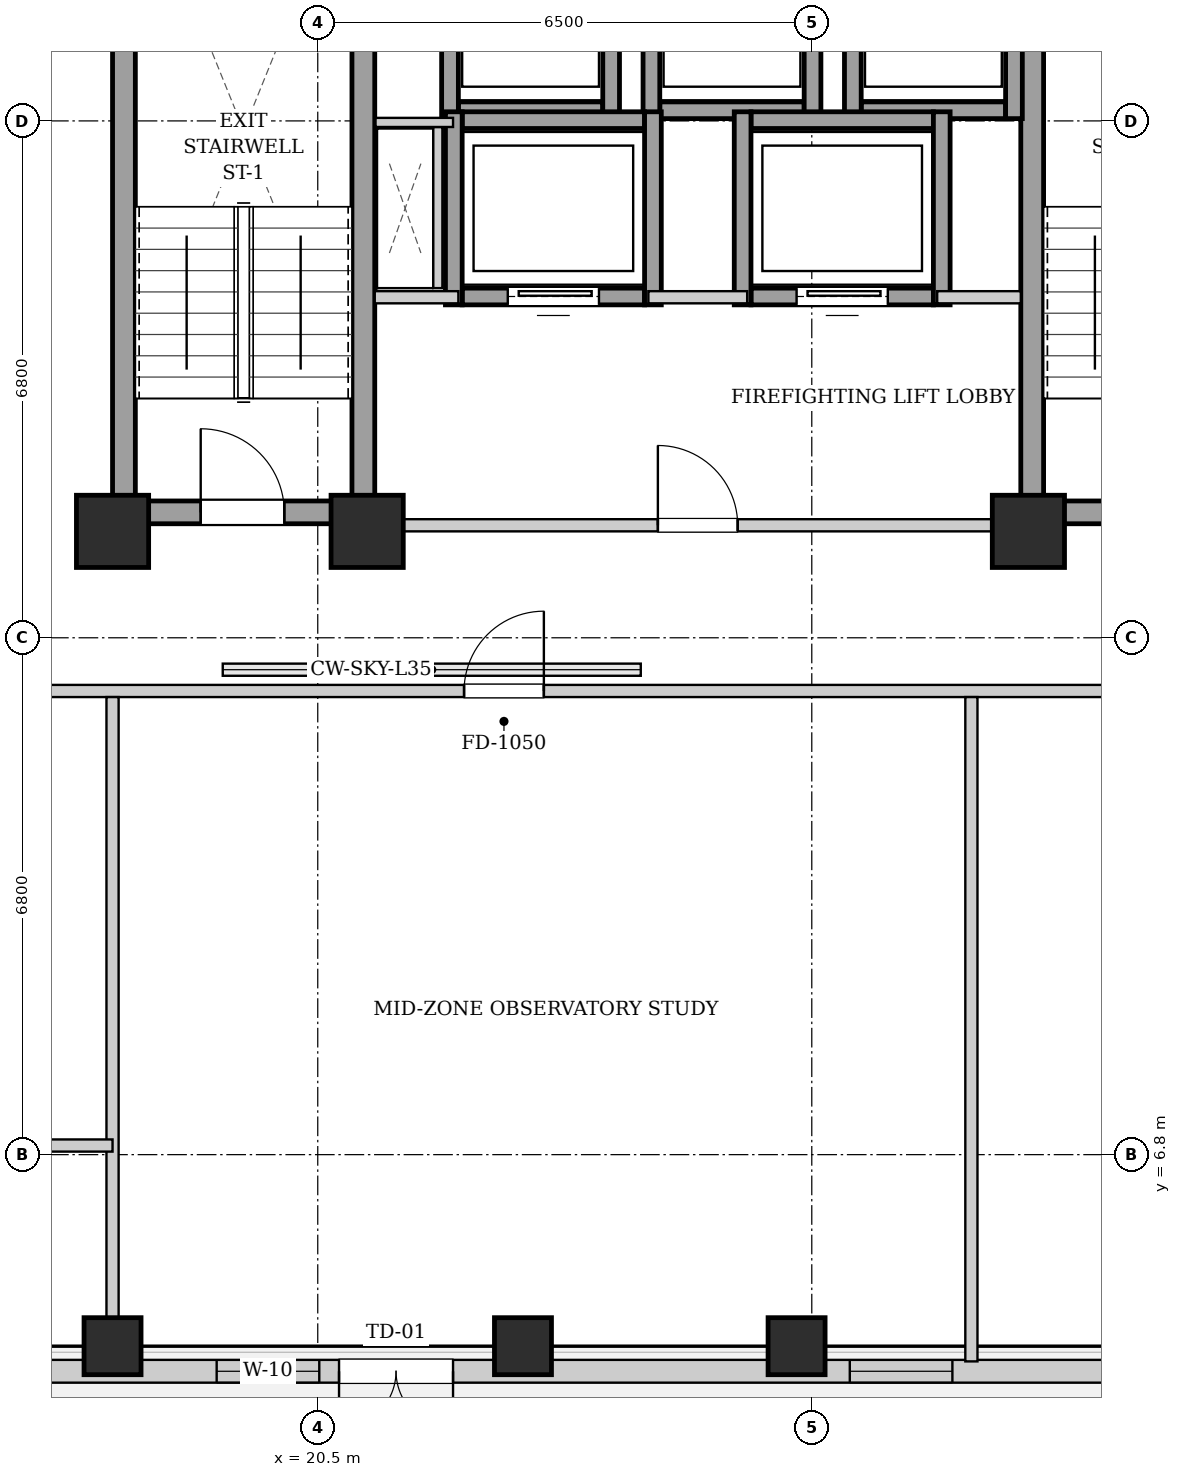
"""IFC4 building model, lengths in metres.
Left out: names, types, materials, properties, quantities, classifications, styles, units other than length and angle.
Written with IfcOpenShell. Run it as: python <this file> out.ifc"""

import sys

from ifc_helpers import new_model, si_unit, direction, frame, frame_2d, origin, origin_2d, place, context, subcontext, project, spatial, rectangle, extrude, element, fill, save


model = new_model("IFC4")
c1 = context("Model", 3, precision=1e-05, world=origin(), true_north=direction((0.0, 1.0)))
c2 = subcontext(c1, "Body", "Model", "MODEL_VIEW")
j1 = project(units=[si_unit("LENGTHUNIT", "METRE"), si_unit("PLANEANGLEUNIT", "RADIAN")], contexts=[c1])
p1 = place(None, origin())
s1 = spatial("IfcSite", under=j1, at=p1, CompositionType="ELEMENT")
p2 = place(p1, origin())
s2 = spatial("IfcBuilding", under=s1, at=p2, CompositionType="ELEMENT")
p3 = place(p2, frame((0.0, 0.0, 124.4)))
s3 = spatial("IfcBuildingStorey", under=s2, at=p3, CompositionType="ELEMENT", Elevation=124.4)
for number, where, z_axis, x_axis in (
    (1, (17.8, 4.28, 0.0), (0.0, 0.0, 1.0), (1.0, 0.0, 0.0)),
    (2, (23.2, 4.28, 0.0), (0.0, 0.0, 1.0), (1.0, 0.0, 0.0)),
    (3, (26.8, 4.28, 0.0), (0.0, 0.0, 1.0), (1.0, 0.0, 0.0)),
):
    element("IfcColumn", number, at=place(p3, frame(where, z_axis=z_axis, x_axis=x_axis)), inside=s3, PredefinedType="COLUMN", context=c2, shape_type="SweptSolid", body=[
        extrude(rectangle(XDim=0.75, YDim=0.75, at=origin_2d()), origin(), (0.0, 0.0, 1.0), 3.25),
    ])
for number, where, z_axis, x_axis in (
    (4, (17.8, 15.0, 0.0), (0.0, 0.0, 1.0), (1.0, 0.0, 0.0)),
    (5, (21.15, 15.0, 0.0), (0.0, 0.0, 1.0), (1.0, 0.0, 0.0)),
    (6, (29.85, 15.0, 0.0), (0.0, 0.0, 1.0), (1.0, 0.0, 0.0)),
):
    element("IfcColumn", number, at=place(p3, frame(where, z_axis=z_axis, x_axis=x_axis)), inside=s3, PredefinedType="COLUMN", context=c2, shape_type="SweptSolid", body=[
        extrude(rectangle(XDim=0.95, YDim=0.95, at=origin_2d()), origin(), (0.0, 0.0, 1.0), 3.25),
    ])
p4 = place(p3, frame((37.8, 3.95, 0.0), z_axis=(0.0, 0.0, 1.0), x_axis=(-1.0, 0.0, 0.0)))
e7 = element("IfcWall", 7, at=p4, inside=s3, PredefinedType="SOLIDWALL", context=c2, shape_type="SweptSolid", body=[
    extrude(rectangle(XDim=27.8, YDim=0.3, at=frame_2d((13.9, 0.0))), origin(), (0.0, 0.0, 1.0), 2.99),
])
p5 = place(p4, frame((15.52, 0.0, 0.0)))
e8 = element("IfcOpeningElement", 8, at=p5, cuts=e7, PredefinedType="OPENING", context=c2, shape_type="SweptSolid", body=[
    extrude(rectangle(XDim=1.5, YDim=1.982, at=frame_2d((0.75, 0.991))), frame((0.0, 0.16, 0.0), z_axis=(0.0, -1.0, 0.0), x_axis=(1.0, 0.0, 0.0)), (0.0, 0.0, 1.0), 0.32),
])
p6 = place(p4, frame((17.28, 0.0, 0.55)))
e9 = element("IfcOpeningElement", 9, at=p6, cuts=e7, PredefinedType="OPENING", context=c2, shape_type="SweptSolid", body=[
    extrude(rectangle(XDim=1.35, YDim=1.2, at=frame_2d((0.675, 0.6))), frame((0.0, 0.16, 0.0), z_axis=(0.0, -1.0, 0.0), x_axis=(1.0, 0.0, 0.0)), (0.0, 0.0, 1.0), 0.32),
])
p7 = place(p4, frame((8.95, 0.0, 0.55)))
e10 = element("IfcOpeningElement", 10, at=p7, cuts=e7, PredefinedType="OPENING", context=c2, shape_type="SweptSolid", body=[
    extrude(rectangle(XDim=1.35, YDim=1.2, at=frame_2d((0.675, 0.6))), frame((0.0, 0.16, 0.0), z_axis=(0.0, -1.0, 0.0), x_axis=(1.0, 0.0, 0.0)), (0.0, 0.0, 1.0), 0.32),
])
p8 = place(p4, frame((5.135, 0.0, 0.55)))
e11 = element("IfcOpeningElement", 11, at=p8, cuts=e7, PredefinedType="OPENING", context=c2, shape_type="SweptSolid", body=[
    extrude(rectangle(XDim=1.35, YDim=1.2, at=frame_2d((0.675, 0.6))), frame((0.0, 0.16, 0.0), z_axis=(0.0, -1.0, 0.0), x_axis=(1.0, 0.0, 0.0)), (0.0, 0.0, 1.0), 0.32),
])
p9 = place(p4, frame((1.252, 0.0, 0.55)))
e12 = element("IfcOpeningElement", 12, at=p9, cuts=e7, PredefinedType="OPENING", context=c2, shape_type="SweptSolid", body=[
    extrude(rectangle(XDim=1.35, YDim=1.2, at=frame_2d((0.675, 0.6))), frame((0.0, 0.16, 0.0), z_axis=(0.0, -1.0, 0.0), x_axis=(1.0, 0.0, 0.0)), (0.0, 0.0, 1.0), 0.32),
])
for number, where, z_axis, x_axis in (
    (13, (17.95, 15.1, 0.0), (0.0, 0.0, 1.0), (0.0, 1.0, 0.0)),
    (14, (21.1, 15.1, 0.0), (0.0, 0.0, 1.0), (0.0, 1.0, 0.0)),
):
    element("IfcWall", number, at=place(p3, frame(where, z_axis=z_axis, x_axis=x_axis)), inside=s3, PredefinedType="SHEAR", context=c2, shape_type="SweptSolid", body=[
        extrude(rectangle(XDim=9.0, YDim=0.3, at=frame_2d((4.5, 0.0))), origin(), (0.0, 0.0, 1.0), 2.99),
    ])
p10 = place(p3, frame((18.1, 15.25, 0.0), z_axis=(0.0, 0.0, 1.0), x_axis=(1.0, 0.0, 0.0)))
e15 = element("IfcWall", 15, at=p10, inside=s3, PredefinedType="SHEAR", context=c2, shape_type="SweptSolid", body=[
    extrude(rectangle(XDim=2.85, YDim=0.3, at=frame_2d((1.425, 0.0))), origin(), (0.0, 0.0, 1.0), 2.99),
])
p11 = place(p10, frame((0.86, 0.0, 0.0)))
e16 = element("IfcOpeningElement", 16, at=p11, cuts=e15, PredefinedType="OPENING", context=c2, shape_type="SweptSolid", body=[
    extrude(rectangle(XDim=1.1, YDim=2.05, at=frame_2d((0.55, 1.025))), frame((0.0, 0.16, 0.0), z_axis=(0.0, -1.0, 0.0), x_axis=(1.0, 0.0, 0.0)), (0.0, 0.0, 1.0), 0.32),
])
p12 = place(p3, frame((29.9, 15.1, 0.0), z_axis=(0.0, 0.0, 1.0), x_axis=(0.0, 1.0, 0.0)))
e17 = element("IfcWall", 17, at=p12, inside=s3, PredefinedType="SHEAR", context=c2, shape_type="SweptSolid", body=[
    extrude(rectangle(XDim=9.0, YDim=0.3, at=frame_2d((4.5, 0.0))), origin(), (0.0, 0.0, 1.0), 2.99),
])
p13 = place(p3, frame((30.05, 15.25, 0.0), z_axis=(0.0, 0.0, 1.0), x_axis=(1.0, 0.0, 0.0)))
e18 = element("IfcWall", 18, at=p13, inside=s3, PredefinedType="SHEAR", context=c2, shape_type="SweptSolid", body=[
    extrude(rectangle(XDim=2.85, YDim=0.3, at=frame_2d((1.425, 0.0))), origin(), (0.0, 0.0, 1.0), 2.99),
])
p14 = place(p13, frame((0.86, 0.0, 0.0)))
e19 = element("IfcOpeningElement", 19, at=p14, cuts=e18, PredefinedType="OPENING", context=c2, shape_type="SweptSolid", body=[
    extrude(rectangle(XDim=1.1, YDim=2.05, at=frame_2d((0.55, 1.025))), frame((0.0, 0.16, 0.0), z_axis=(0.0, -1.0, 0.0), x_axis=(1.0, 0.0, 0.0)), (0.0, 0.0, 1.0), 0.32),
])
p15 = place(p3, frame((22.35, 20.54, 0.0), z_axis=(0.0, 0.0, 1.0), x_axis=(1.0, 0.0, 0.0)))
e20 = element("IfcWall", 20, at=p15, inside=s3, PredefinedType="SHEAR", context=c2, shape_type="SweptSolid", body=[
    extrude(rectangle(XDim=1.9, YDim=0.22, at=frame_2d((0.95, 0.0))), origin(), (0.0, 0.0, 1.0), 2.99),
])
for number, where, z_axis, x_axis in (
    (21, (22.24, 20.43, 0.0), (0.0, 0.0, 1.0), (0.0, 1.0, 0.0)),
    (22, (24.36, 20.43, 0.0), (0.0, 0.0, 1.0), (0.0, 1.0, 0.0)),
):
    element("IfcWall", number, at=place(p3, frame(where, z_axis=z_axis, x_axis=x_axis)), inside=s3, PredefinedType="SHEAR", context=c2, shape_type="SweptSolid", body=[
        extrude(rectangle(XDim=2.44, YDim=0.22, at=frame_2d((1.22, 0.0))), origin(), (0.0, 0.0, 1.0), 2.99),
    ])
p16 = place(p3, frame((25.0, 20.54, 0.0), z_axis=(0.0, 0.0, 1.0), x_axis=(1.0, 0.0, 0.0)))
e23 = element("IfcWall", 23, at=p16, inside=s3, PredefinedType="SHEAR", context=c2, shape_type="SweptSolid", body=[
    extrude(rectangle(XDim=1.9, YDim=0.22, at=frame_2d((0.95, 0.0))), origin(), (0.0, 0.0, 1.0), 2.99),
])
for number, where, z_axis, x_axis in (
    (24, (24.89, 20.43, 0.0), (0.0, 0.0, 1.0), (0.0, 1.0, 0.0)),
    (25, (27.01, 20.43, 0.0), (0.0, 0.0, 1.0), (0.0, 1.0, 0.0)),
):
    element("IfcWall", number, at=place(p3, frame(where, z_axis=z_axis, x_axis=x_axis)), inside=s3, PredefinedType="SHEAR", context=c2, shape_type="SweptSolid", body=[
        extrude(rectangle(XDim=2.44, YDim=0.22, at=frame_2d((1.22, 0.0))), origin(), (0.0, 0.0, 1.0), 2.99),
    ])
p17 = place(p3, frame((27.65, 20.54, 0.0), z_axis=(0.0, 0.0, 1.0), x_axis=(1.0, 0.0, 0.0)))
e26 = element("IfcWall", 26, at=p17, inside=s3, PredefinedType="SHEAR", context=c2, shape_type="SweptSolid", body=[
    extrude(rectangle(XDim=1.9, YDim=0.22, at=frame_2d((0.95, 0.0))), origin(), (0.0, 0.0, 1.0), 2.99),
])
for number, where, z_axis, x_axis in (
    (27, (27.54, 20.43, 0.0), (0.0, 0.0, 1.0), (0.0, 1.0, 0.0)),
    (28, (29.66, 20.43, 0.0), (0.0, 0.0, 1.0), (0.0, 1.0, 0.0)),
):
    element("IfcWall", number, at=place(p3, frame(where, z_axis=z_axis, x_axis=x_axis)), inside=s3, PredefinedType="SHEAR", context=c2, shape_type="SweptSolid", body=[
        extrude(rectangle(XDim=2.44, YDim=0.22, at=frame_2d((1.22, 0.0))), origin(), (0.0, 0.0, 1.0), 2.99),
    ])
p18 = place(p3, frame((22.4, 18.09, 0.0), z_axis=(0.0, 0.0, 1.0), x_axis=(1.0, 0.0, 0.0)))
e29 = element("IfcWall", 29, at=p18, inside=s3, PredefinedType="SHEAR", context=c2, shape_type="SweptSolid", body=[
    extrude(rectangle(XDim=2.4, YDim=0.22, at=frame_2d((1.2, 0.0))), origin(), (0.0, 0.0, 1.0), 2.99),
])
p19 = place(p18, frame((0.6, 0.0, 0.0)))
e30 = element("IfcOpeningElement", 30, at=p19, cuts=e29, PredefinedType="OPENING", context=c2, shape_type="SweptSolid", body=[
    extrude(rectangle(XDim=1.2, YDim=2.15, at=frame_2d((0.6, 1.075))), frame((0.0, 0.12, 0.0), z_axis=(0.0, -1.0, 0.0), x_axis=(1.0, 0.0, 0.0)), (0.0, 0.0, 1.0), 0.24),
])
p20 = place(p3, frame((22.4, 20.41, 0.0), z_axis=(0.0, 0.0, 1.0), x_axis=(1.0, 0.0, 0.0)))
e31 = element("IfcWall", 31, at=p20, inside=s3, PredefinedType="SHEAR", context=c2, shape_type="SweptSolid", body=[
    extrude(rectangle(XDim=2.4, YDim=0.22, at=frame_2d((1.2, 0.0))), origin(), (0.0, 0.0, 1.0), 2.99),
])
for number, where, z_axis, x_axis in (
    (32, (22.29, 17.98, 0.0), (0.0, 0.0, 1.0), (0.0, 1.0, 0.0)),
    (33, (24.91, 17.98, 0.0), (0.0, 0.0, 1.0), (0.0, 1.0, 0.0)),
):
    element("IfcWall", number, at=place(p3, frame(where, z_axis=z_axis, x_axis=x_axis)), inside=s3, PredefinedType="SHEAR", context=c2, shape_type="SweptSolid", body=[
        extrude(rectangle(XDim=2.54, YDim=0.22, at=frame_2d((1.27, 0.0))), origin(), (0.0, 0.0, 1.0), 2.99),
    ])
p21 = place(p3, frame((26.2, 18.09, 0.0), z_axis=(0.0, 0.0, 1.0), x_axis=(1.0, 0.0, 0.0)))
e34 = element("IfcWall", 34, at=p21, inside=s3, PredefinedType="SHEAR", context=c2, shape_type="SweptSolid", body=[
    extrude(rectangle(XDim=2.4, YDim=0.22, at=frame_2d((1.2, 0.0))), origin(), (0.0, 0.0, 1.0), 2.99),
])
p22 = place(p21, frame((0.6, 0.0, 0.0)))
e35 = element("IfcOpeningElement", 35, at=p22, cuts=e34, PredefinedType="OPENING", context=c2, shape_type="SweptSolid", body=[
    extrude(rectangle(XDim=1.2, YDim=2.15, at=frame_2d((0.6, 1.075))), frame((0.0, 0.12, 0.0), z_axis=(0.0, -1.0, 0.0), x_axis=(1.0, 0.0, 0.0)), (0.0, 0.0, 1.0), 0.24),
])
p23 = place(p3, frame((26.2, 20.41, 0.0), z_axis=(0.0, 0.0, 1.0), x_axis=(1.0, 0.0, 0.0)))
e36 = element("IfcWall", 36, at=p23, inside=s3, PredefinedType="SHEAR", context=c2, shape_type="SweptSolid", body=[
    extrude(rectangle(XDim=2.4, YDim=0.22, at=frame_2d((1.2, 0.0))), origin(), (0.0, 0.0, 1.0), 2.99),
])
for number, where, z_axis, x_axis in (
    (37, (26.09, 17.98, 0.0), (0.0, 0.0, 1.0), (0.0, 1.0, 0.0)),
    (38, (28.71, 17.98, 0.0), (0.0, 0.0, 1.0), (0.0, 1.0, 0.0)),
):
    element("IfcWall", number, at=place(p3, frame(where, z_axis=z_axis, x_axis=x_axis)), inside=s3, PredefinedType="SHEAR", context=c2, shape_type="SweptSolid", body=[
        extrude(rectangle(XDim=2.54, YDim=0.22, at=frame_2d((1.27, 0.0))), origin(), (0.0, 0.0, 1.0), 2.99),
    ])
p24 = place(p3, frame((21.25, 15.08, 0.0), z_axis=(0.0, 0.0, 1.0), x_axis=(1.0, 0.0, 0.0)))
e39 = element("IfcWall", 39, at=p24, inside=s3, PredefinedType="PARTITIONING", context=c2, shape_type="SweptSolid", body=[
    extrude(rectangle(XDim=8.5, YDim=0.16, at=frame_2d((4.25, 0.0))), origin(), (0.0, 0.0, 1.0), 2.426),
])
p25 = place(p24, frame((3.725, 0.0, 0.0)))
e40 = element("IfcOpeningElement", 40, at=p25, cuts=e39, PredefinedType="OPENING", context=c2, shape_type="SweptSolid", body=[
    extrude(rectangle(XDim=1.05, YDim=2.05, at=frame_2d((0.525, 1.025))), frame((0.0, 0.09, 0.0), z_axis=(0.0, -1.0, 0.0), x_axis=(1.0, 0.0, 0.0)), (0.0, 0.0, 1.0), 0.18),
])
p26 = place(p3, frame((21.25, 18.08, 0.0), z_axis=(0.0, 0.0, 1.0), x_axis=(1.0, 0.0, 0.0)))
e41 = element("IfcWall", 41, at=p26, inside=s3, PredefinedType="PARTITIONING", context=c2, shape_type="SweptSolid", body=[
    extrude(rectangle(XDim=1.1, YDim=0.16, at=frame_2d((0.55, 0.0))), origin(), (0.0, 0.0, 1.0), 2.99),
])
p27 = place(p3, frame((24.85, 18.08, 0.0), z_axis=(0.0, 0.0, 1.0), x_axis=(1.0, 0.0, 0.0)))
e42 = element("IfcWall", 42, at=p27, inside=s3, PredefinedType="PARTITIONING", context=c2, shape_type="SweptSolid", body=[
    extrude(rectangle(XDim=1.3, YDim=0.16, at=frame_2d((0.65, 0.0))), origin(), (0.0, 0.0, 1.0), 2.99),
])
p28 = place(p3, frame((28.65, 18.08, 0.0), z_axis=(0.0, 0.0, 1.0), x_axis=(1.0, 0.0, 0.0)))
e43 = element("IfcWall", 43, at=p28, inside=s3, PredefinedType="PARTITIONING", context=c2, shape_type="SweptSolid", body=[
    extrude(rectangle(XDim=1.1, YDim=0.16, at=frame_2d((0.55, 0.0))), origin(), (0.0, 0.0, 1.0), 2.99),
])
p29 = place(p3, frame((22.08, 18.2, 0.0), z_axis=(0.0, 0.0, 1.0), x_axis=(0.0, 1.0, 0.0)))
e44 = element("IfcWall", 44, at=p29, inside=s3, PredefinedType="PARTITIONING", context=c2, shape_type="SweptSolid", body=[
    extrude(rectangle(XDim=2.12, YDim=0.12, at=frame_2d((1.06, 0.0))), origin(), (0.0, 0.0, 1.0), 2.99),
])
p30 = place(p3, frame((22.28, 20.38, 0.0), z_axis=(0.0, 0.0, 1.0), x_axis=(-1.0, 0.0, 0.0)))
e45 = element("IfcWall", 45, at=p30, inside=s3, PredefinedType="PARTITIONING", context=c2, shape_type="SweptSolid", body=[
    extrude(rectangle(XDim=1.02, YDim=0.12, at=frame_2d((0.51, 0.0))), origin(), (0.0, 0.0, 1.0), 2.99),
])
p31 = place(p3, frame((10.7, 12.9, 0.0), z_axis=(0.0, 0.0, 1.0), x_axis=(1.0, 0.0, 0.0)))
e46 = element("IfcWall", 46, at=p31, inside=s3, PredefinedType="PARTITIONING", context=c2, shape_type="SweptSolid", body=[
    extrude(rectangle(XDim=26.4, YDim=0.16, at=frame_2d((13.2, 0.0))), origin(), (0.0, 0.0, 1.0), 2.99),
])
p32 = place(p31, frame((3.05, 0.0, 0.0)))
e47 = element("IfcOpeningElement", 47, at=p32, cuts=e46, PredefinedType="OPENING", context=c2, shape_type="SweptSolid", body=[
    extrude(rectangle(XDim=0.9, YDim=2.05, at=frame_2d((0.45, 1.025))), frame((0.0, 0.09, 0.0), z_axis=(0.0, -1.0, 0.0), x_axis=(1.0, 0.0, 0.0)), (0.0, 0.0, 1.0), 0.18),
])
p33 = place(p31, frame((11.725, 0.0, 0.0)))
e48 = element("IfcOpeningElement", 48, at=p33, cuts=e46, PredefinedType="OPENING", context=c2, shape_type="SweptSolid", body=[
    extrude(rectangle(XDim=1.05, YDim=2.05, at=frame_2d((0.525, 1.025))), frame((0.0, 0.09, 0.0), z_axis=(0.0, -1.0, 0.0), x_axis=(1.0, 0.0, 0.0)), (0.0, 0.0, 1.0), 0.18),
])
p34 = place(p31, frame((21.55, 0.0, 0.0)))
e49 = element("IfcOpeningElement", 49, at=p34, cuts=e46, PredefinedType="OPENING", context=c2, shape_type="SweptSolid", body=[
    extrude(rectangle(XDim=0.9, YDim=2.05, at=frame_2d((0.45, 1.025))), frame((0.0, 0.09, 0.0), z_axis=(0.0, -1.0, 0.0), x_axis=(1.0, 0.0, 0.0)), (0.0, 0.0, 1.0), 0.18),
])
p35 = place(p3, frame((17.8, 4.08, 0.0), z_axis=(0.0, 0.0, 1.0), x_axis=(0.0, 1.0, 0.0)))
e50 = element("IfcWall", 50, at=p35, inside=s3, PredefinedType="PARTITIONING", context=c2, shape_type="SweptSolid", body=[
    extrude(rectangle(XDim=8.74, YDim=0.16, at=frame_2d((4.37, 0.0))), origin(), (0.0, 0.0, 1.0), 2.426),
])
p36 = place(p3, frame((29.1, 4.08, 0.0), z_axis=(0.0, 0.0, 1.0), x_axis=(0.0, 1.0, 0.0)))
e51 = element("IfcWall", 51, at=p36, inside=s3, PredefinedType="PARTITIONING", context=c2, shape_type="SweptSolid", body=[
    extrude(rectangle(XDim=8.74, YDim=0.16, at=frame_2d((4.37, 0.0))), origin(), (0.0, 0.0, 1.0), 2.99),
])
p37 = place(p3, frame((10.6, 6.92, 0.0), z_axis=(0.0, 0.0, 1.0), x_axis=(1.0, 0.0, 0.0)))
e52 = element("IfcWall", 52, at=p37, inside=s3, PredefinedType="PARTITIONING", context=c2, shape_type="SweptSolid", body=[
    extrude(rectangle(XDim=7.2, YDim=0.16, at=frame_2d((3.6, 0.0))), origin(), (0.0, 0.0, 1.0), 2.99),
])
p38 = place(p11, origin())
e53 = element("IfcDoor", 53, at=p38, inside=s3, OperationType="SINGLE_SWING_LEFT", PredefinedType="DOOR", context=c2, shape_type="SweptSolid", body=[
    extrude(rectangle(XDim=1.1, YDim=2.05, at=frame_2d((0.55, 1.025))), frame((0.0, 0.025, 0.0), z_axis=(0.0, -1.0, 0.0), x_axis=(1.0, 0.0, 0.0)), (0.0, 0.0, 1.0), 0.05),
])
fill(e16, e53)
p39 = place(p19, origin())
e54 = element("IfcDoor", 54, at=p39, inside=s3, OperationType="SLIDING_TO_LEFT", PredefinedType="DOOR", context=c2, shape_type="SweptSolid", body=[
    extrude(rectangle(XDim=1.2, YDim=2.15, at=frame_2d((0.6, 1.075))), frame((0.0, 0.025, 0.0), z_axis=(0.0, -1.0, 0.0), x_axis=(1.0, 0.0, 0.0)), (0.0, 0.0, 1.0), 0.05),
])
fill(e30, e54)
p40 = place(p22, origin())
e55 = element("IfcDoor", 55, at=p40, inside=s3, OperationType="SLIDING_TO_LEFT", PredefinedType="DOOR", context=c2, shape_type="SweptSolid", body=[
    extrude(rectangle(XDim=1.2, YDim=2.15, at=frame_2d((0.6, 1.075))), frame((0.0, 0.025, 0.0), z_axis=(0.0, -1.0, 0.0), x_axis=(1.0, 0.0, 0.0)), (0.0, 0.0, 1.0), 0.05),
])
fill(e35, e55)
p41 = place(p25, origin())
e56 = element("IfcDoor", 56, at=p41, inside=s3, OperationType="SINGLE_SWING_LEFT", PredefinedType="DOOR", context=c2, shape_type="SweptSolid", body=[
    extrude(rectangle(XDim=1.05, YDim=2.05, at=frame_2d((0.525, 1.025))), frame((0.0, 0.025, 0.0), z_axis=(0.0, -1.0, 0.0), x_axis=(1.0, 0.0, 0.0)), (0.0, 0.0, 1.0), 0.05),
])
fill(e40, e56)
p42 = place(p33, origin())
e57 = element("IfcDoor", 57, at=p42, inside=s3, OperationType="SINGLE_SWING_RIGHT", PredefinedType="DOOR", context=c2, shape_type="SweptSolid", body=[
    extrude(rectangle(XDim=1.05, YDim=2.05, at=frame_2d((0.525, 1.025))), frame((0.0, 0.025, 0.0), z_axis=(0.0, -1.0, 0.0), x_axis=(1.0, 0.0, 0.0)), (0.0, 0.0, 1.0), 0.05),
])
fill(e48, e57)
p43 = place(p5, origin())
e58 = element("IfcDoor", 58, at=p43, inside=s3, OperationType="DOUBLE_SWING_LEFT", PredefinedType="DOOR", context=c2, shape_type="SweptSolid", body=[
    extrude(rectangle(XDim=1.5, YDim=1.982, at=frame_2d((0.75, 0.991))), frame((0.0, 0.025, 0.0), z_axis=(0.0, -1.0, 0.0), x_axis=(1.0, 0.0, 0.0)), (0.0, 0.0, 1.0), 0.05),
])
fill(e8, e58)
p44 = place(p6, origin())
e59 = element("IfcWindow", 59, at=p44, inside=s3, PartitioningType="SINGLE_PANEL", PredefinedType="WINDOW", context=c2, shape_type="SweptSolid", body=[
    extrude(rectangle(XDim=1.35, YDim=1.2, at=frame_2d((0.675, 0.6))), frame((0.0, 0.03, 0.0), z_axis=(0.0, -1.0, 0.0), x_axis=(1.0, 0.0, 0.0)), (0.0, 0.0, 1.0), 0.06),
])
fill(e9, e59)
p45 = place(p7, origin())
e60 = element("IfcWindow", 60, at=p45, inside=s3, PartitioningType="SINGLE_PANEL", PredefinedType="WINDOW", context=c2, shape_type="SweptSolid", body=[
    extrude(rectangle(XDim=1.35, YDim=1.2, at=frame_2d((0.675, 0.6))), frame((0.0, 0.03, 0.0), z_axis=(0.0, -1.0, 0.0), x_axis=(1.0, 0.0, 0.0)), (0.0, 0.0, 1.0), 0.06),
])
fill(e10, e60)
save(model, sys.argv[1])
